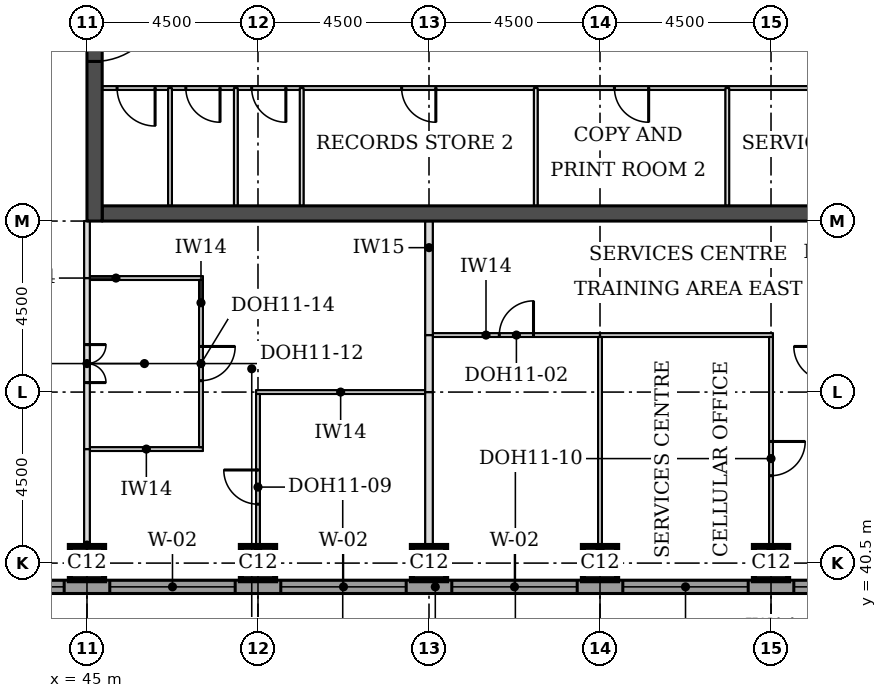
"""IFC4 building model, lengths in metres.
Left out: names, types, materials, properties, quantities, classifications, styles, units other than length and angle.
Written with IfcOpenShell. Run it as: python <this file> out.ifc"""

import sys

from ifc_helpers import new_model, si_unit, direction, frame, frame_2d, origin, origin_2d, place, context, subcontext, project, spatial, rectangle, extrude, element, fill, save


model = new_model("IFC4")
c1 = context("Model", 3, precision=1e-05, world=origin(), true_north=direction((0.0, 1.0)))
c2 = subcontext(c1, "Body", "Model", "MODEL_VIEW")
j1 = project(units=[si_unit("LENGTHUNIT", "METRE"), si_unit("PLANEANGLEUNIT", "RADIAN")], contexts=[c1])
p1 = place(None, origin())
s1 = spatial("IfcSite", under=j1, at=p1, CompositionType="ELEMENT")
p2 = place(p1, origin())
s2 = spatial("IfcBuilding", under=s1, at=p2, CompositionType="ELEMENT")
p3 = place(p2, frame((0.0, 0.0, 237.8)))
s3 = spatial("IfcBuildingStorey", under=s2, at=p3, CompositionType="ELEMENT", Elevation=237.8)
for number, where, z_axis, x_axis in (
    (1, (45.0, 40.5, 0.0), (0.0, 0.0, 1.0), (1.0, 0.0, 0.0)),
    (2, (49.5, 40.5, 0.0), (0.0, 0.0, 1.0), (1.0, 0.0, 0.0)),
    (3, (54.0, 40.5, 0.0), (0.0, 0.0, 1.0), (1.0, 0.0, 0.0)),
    (4, (58.5, 40.5, 0.0), (0.0, 0.0, 1.0), (1.0, 0.0, 0.0)),
    (5, (63.0, 40.5, 0.0), (0.0, 0.0, 1.0), (1.0, 0.0, 0.0)),
):
    element("IfcColumn", number, at=place(p3, frame(where, z_axis=z_axis, x_axis=x_axis)), inside=s3, PredefinedType="COLUMN", context=c2, shape_type="SweptSolid", body=[
        extrude(rectangle(XDim=0.9, YDim=0.9, at=origin_2d()), origin(), (0.0, 0.0, 1.0), 3.7),
    ])
p4 = place(p3, frame((45.4, 49.7, 0.0), z_axis=(0.0, 0.0, 1.0), x_axis=(1.0, 0.0, 0.0)))
e6 = element("IfcWall", 6, at=p4, inside=s3, PredefinedType="SHEAR", context=c2, shape_type="SweptSolid", body=[
    extrude(rectangle(XDim=21.7, YDim=0.4, at=frame_2d((10.85, 0.0))), origin(), (0.0, 0.0, 1.0), 3.7),
])
p5 = place(p3, frame((45.2, 49.5, 0.0), z_axis=(0.0, 0.0, 1.0), x_axis=(0.0, 1.0, 0.0)))
e7 = element("IfcWall", 7, at=p5, inside=s3, PredefinedType="SHEAR", context=c2, shape_type="SweptSolid", body=[
    extrude(rectangle(XDim=22.5, YDim=0.4, at=frame_2d((11.25, 0.0))), origin(), (0.0, 0.0, 1.0), 3.7),
])
p6 = place(p5, frame((4.2, 0.0, 0.0)))
e8 = element("IfcOpeningElement", 8, at=p6, cuts=e7, PredefinedType="OPENING", context=c2, shape_type="SweptSolid", body=[
    extrude(rectangle(XDim=1.8, YDim=2.1, at=frame_2d((0.9, 1.05))), frame((0.0, 0.21, 0.0), z_axis=(0.0, -1.0, 0.0), x_axis=(1.0, 0.0, 0.0)), (0.0, 0.0, 1.0), 0.42),
])
p7 = place(p5, frame((6.9, 0.0, 0.0)))
e9 = element("IfcOpeningElement", 9, at=p7, cuts=e7, PredefinedType="OPENING", context=c2, shape_type="SweptSolid", body=[
    extrude(rectangle(XDim=1.1, YDim=2.1, at=frame_2d((0.55, 1.05))), frame((0.0, 0.21, 0.0), z_axis=(0.0, -1.0, 0.0), x_axis=(1.0, 0.0, 0.0)), (0.0, 0.0, 1.0), 0.42),
])
p8 = place(p5, frame((13.6, 0.0, 0.0)))
e10 = element("IfcOpeningElement", 10, at=p8, cuts=e7, PredefinedType="OPENING", context=c2, shape_type="SweptSolid", body=[
    extrude(rectangle(XDim=1.1, YDim=2.1, at=frame_2d((0.55, 1.05))), frame((0.0, 0.21, 0.0), z_axis=(0.0, -1.0, 0.0), x_axis=(1.0, 0.0, 0.0)), (0.0, 0.0, 1.0), 0.42),
])
p9 = place(p5, frame((16.5, 0.0, 0.0)))
e11 = element("IfcOpeningElement", 11, at=p9, cuts=e7, PredefinedType="OPENING", context=c2, shape_type="SweptSolid", body=[
    extrude(rectangle(XDim=1.8, YDim=2.1, at=frame_2d((0.9, 1.05))), frame((0.0, 0.21, 0.0), z_axis=(0.0, -1.0, 0.0), x_axis=(1.0, 0.0, 0.0)), (0.0, 0.0, 1.0), 0.42),
])
p10 = place(p3, frame((36.0, 39.875, 0.0), z_axis=(0.0, 0.0, 1.0), x_axis=(1.0, 0.0, 0.0)))
e12 = element("IfcWall", 12, at=p10, inside=s3, PredefinedType="STANDARD", context=c2, shape_type="SweptSolid", body=[
    extrude(rectangle(XDim=36.331, YDim=0.35, at=frame_2d((18.166, 0.0))), origin(), (0.0, 0.0, 1.0), 3.525),
])
p11 = place(p10, frame((5.1, 0.0, 0.9)))
e13 = element("IfcOpeningElement", 13, at=p11, cuts=e12, PredefinedType="OPENING", context=c2, shape_type="SweptSolid", body=[
    extrude(rectangle(XDim=3.3, YDim=1.9, at=frame_2d((1.65, 0.95))), frame((0.0, 0.185, 0.0), z_axis=(0.0, -1.0, 0.0), x_axis=(1.0, 0.0, 0.0)), (0.0, 0.0, 1.0), 0.37),
])
p12 = place(p10, frame((9.6, 0.0, 0.9)))
e14 = element("IfcOpeningElement", 14, at=p12, cuts=e12, PredefinedType="OPENING", context=c2, shape_type="SweptSolid", body=[
    extrude(rectangle(XDim=3.3, YDim=1.9, at=frame_2d((1.65, 0.95))), frame((0.0, 0.185, 0.0), z_axis=(0.0, -1.0, 0.0), x_axis=(1.0, 0.0, 0.0)), (0.0, 0.0, 1.0), 0.37),
])
p13 = place(p10, frame((14.1, 0.0, 0.9)))
e15 = element("IfcOpeningElement", 15, at=p13, cuts=e12, PredefinedType="OPENING", context=c2, shape_type="SweptSolid", body=[
    extrude(rectangle(XDim=3.3, YDim=1.9, at=frame_2d((1.65, 0.95))), frame((0.0, 0.185, 0.0), z_axis=(0.0, -1.0, 0.0), x_axis=(1.0, 0.0, 0.0)), (0.0, 0.0, 1.0), 0.37),
])
p14 = place(p10, frame((18.6, 0.0, 0.9)))
e16 = element("IfcOpeningElement", 16, at=p14, cuts=e12, PredefinedType="OPENING", context=c2, shape_type="SweptSolid", body=[
    extrude(rectangle(XDim=3.3, YDim=1.9, at=frame_2d((1.65, 0.95))), frame((0.0, 0.185, 0.0), z_axis=(0.0, -1.0, 0.0), x_axis=(1.0, 0.0, 0.0)), (0.0, 0.0, 1.0), 0.37),
])
p15 = place(p10, frame((23.1, 0.0, 0.9)))
e17 = element("IfcOpeningElement", 17, at=p15, cuts=e12, PredefinedType="OPENING", context=c2, shape_type="SweptSolid", body=[
    extrude(rectangle(XDim=3.3, YDim=1.9, at=frame_2d((1.65, 0.95))), frame((0.0, 0.185, 0.0), z_axis=(0.0, -1.0, 0.0), x_axis=(1.0, 0.0, 0.0)), (0.0, 0.0, 1.0), 0.37),
])
p16 = place(p10, frame((27.6, 0.0, 0.9)))
e18 = element("IfcOpeningElement", 18, at=p16, cuts=e12, PredefinedType="OPENING", context=c2, shape_type="SweptSolid", body=[
    extrude(rectangle(XDim=3.3, YDim=1.9, at=frame_2d((1.65, 0.95))), frame((0.0, 0.185, 0.0), z_axis=(0.0, -1.0, 0.0), x_axis=(1.0, 0.0, 0.0)), (0.0, 0.0, 1.0), 0.37),
])
p17 = place(p3, frame((45.075, 43.5, 0.0), z_axis=(0.0, 0.0, 1.0), x_axis=(1.0, 0.0, 0.0)))
e19 = element("IfcWall", 19, at=p17, inside=s3, PredefinedType="PARTITIONING", context=c2, shape_type="SweptSolid", body=[
    extrude(rectangle(XDim=2.975, YDim=0.1, at=frame_2d((1.488, 0.0))), origin(), (0.0, 0.0, 1.0), 3.55),
])
p18 = place(p3, frame((49.45, 45.0, 0.0), z_axis=(0.0, 0.0, 1.0), x_axis=(1.0, 0.0, 0.0)))
e20 = element("IfcWall", 20, at=p18, inside=s3, PredefinedType="PARTITIONING", context=c2, shape_type="SweptSolid", body=[
    extrude(rectangle(XDim=4.45, YDim=0.1, at=frame_2d((2.225, 0.0))), origin(), (0.0, 0.0, 1.0), 3.55),
])
p19 = place(p3, frame((54.1, 46.5, 0.0), z_axis=(0.0, 0.0, 1.0), x_axis=(1.0, 0.0, 0.0)))
e21 = element("IfcWall", 21, at=p19, inside=s3, PredefinedType="PARTITIONING", context=c2, shape_type="SweptSolid", body=[
    extrude(rectangle(XDim=4.4, YDim=0.1, at=frame_2d((2.2, 0.0))), origin(), (0.0, 0.0, 1.0), 3.55),
])
p20 = place(p19, frame((1.75, 0.0, 0.0)))
e22 = element("IfcOpeningElement", 22, at=p20, cuts=e21, PredefinedType="OPENING", context=c2, shape_type="SweptSolid", body=[
    extrude(rectangle(XDim=0.9, YDim=2.1, at=frame_2d((0.45, 1.05))), frame((0.0, 0.06, 0.0), z_axis=(0.0, -1.0, 0.0), x_axis=(1.0, 0.0, 0.0)), (0.0, 0.0, 1.0), 0.12),
])
p21 = place(p3, frame((58.5, 46.5, 0.0), z_axis=(0.0, 0.0, 1.0), x_axis=(1.0, 0.0, 0.0)))
e23 = element("IfcWall", 23, at=p21, inside=s3, PredefinedType="PARTITIONING", context=c2, shape_type="SweptSolid", body=[
    extrude(rectangle(XDim=4.55, YDim=0.1, at=frame_2d((2.275, 0.0))), origin(), (0.0, 0.0, 1.0), 3.55),
])
p22 = place(p3, frame((45.075, 48.0, 0.0), z_axis=(0.0, 0.0, 1.0), x_axis=(1.0, 0.0, 0.0)))
e24 = element("IfcWall", 24, at=p22, inside=s3, PredefinedType="PARTITIONING", context=c2, shape_type="SweptSolid", body=[
    extrude(rectangle(XDim=2.975, YDim=0.1, at=frame_2d((1.488, 0.0))), origin(), (0.0, 0.0, 1.0), 3.55),
])
p23 = place(p3, frame((45.0, 40.05, 0.0), z_axis=(0.0, 0.0, 1.0), x_axis=(0.0, 1.0, 0.0)))
e25 = element("IfcWall", 25, at=p23, inside=s3, PredefinedType="PARTITIONING", context=c2, shape_type="SweptSolid", body=[
    extrude(rectangle(XDim=3.45, YDim=0.15, at=frame_2d((1.725, 0.0))), origin(), (0.0, 0.0, 1.0), 3.022),
])
p24 = place(p3, frame((49.5, 40.05, 0.0), z_axis=(0.0, 0.0, 1.0), x_axis=(0.0, 1.0, 0.0)))
e26 = element("IfcWall", 26, at=p24, inside=s3, PredefinedType="PARTITIONING", context=c2, shape_type="SweptSolid", body=[
    extrude(rectangle(XDim=4.9, YDim=0.1, at=frame_2d((2.45, 0.0))), origin(), (0.0, 0.0, 1.0), 3.55),
])
p25 = place(p24, frame((2.0, 0.0, 0.0)))
e27 = element("IfcOpeningElement", 27, at=p25, cuts=e26, PredefinedType="OPENING", context=c2, shape_type="SweptSolid", body=[
    extrude(rectangle(XDim=0.9, YDim=2.1, at=frame_2d((0.45, 1.05))), frame((0.0, 0.06, 0.0), z_axis=(0.0, -1.0, 0.0), x_axis=(1.0, 0.0, 0.0)), (0.0, 0.0, 1.0), 0.12),
])
p26 = place(p3, frame((54.0, 40.05, 0.0), z_axis=(0.0, 0.0, 1.0), x_axis=(0.0, 1.0, 0.0)))
e28 = element("IfcWall", 28, at=p26, inside=s3, PredefinedType="PARTITIONING", context=c2, shape_type="SweptSolid", body=[
    extrude(rectangle(XDim=4.95, YDim=0.2, at=frame_2d((2.475, 0.0))), origin(), (0.0, 0.0, 1.0), 3.55),
])
p27 = place(p3, frame((58.5, 40.05, 0.0), z_axis=(0.0, 0.0, 1.0), x_axis=(0.0, 1.0, 0.0)))
e29 = element("IfcWall", 29, at=p27, inside=s3, PredefinedType="PARTITIONING", context=c2, shape_type="SweptSolid", body=[
    extrude(rectangle(XDim=6.4, YDim=0.1, at=frame_2d((3.2, 0.0))), origin(), (0.0, 0.0, 1.0), 3.55),
])
p28 = place(p3, frame((63.0, 40.05, 0.0), z_axis=(0.0, 0.0, 1.0), x_axis=(0.0, 1.0, 0.0)))
e30 = element("IfcWall", 30, at=p28, inside=s3, PredefinedType="PARTITIONING", context=c2, shape_type="SweptSolid", body=[
    extrude(rectangle(XDim=6.4, YDim=0.1, at=frame_2d((3.2, 0.0))), origin(), (0.0, 0.0, 1.0), 3.55),
])
p29 = place(p28, frame((2.75, 0.0, 0.0)))
e31 = element("IfcOpeningElement", 31, at=p29, cuts=e30, PredefinedType="OPENING", context=c2, shape_type="SweptSolid", body=[
    extrude(rectangle(XDim=0.9, YDim=2.1, at=frame_2d((0.45, 1.05))), frame((0.0, 0.06, 0.0), z_axis=(0.0, -1.0, 0.0), x_axis=(1.0, 0.0, 0.0)), (0.0, 0.0, 1.0), 0.12),
])
p30 = place(p3, frame((45.0, 43.5, 0.0), z_axis=(0.0, 0.0, 1.0), x_axis=(0.0, 1.0, 0.0)))
e32 = element("IfcWall", 32, at=p30, inside=s3, PredefinedType="PARTITIONING", context=c2, shape_type="SweptSolid", body=[
    extrude(rectangle(XDim=4.5, YDim=0.15, at=frame_2d((2.25, 0.0))), origin(), (0.0, 0.0, 1.0), 3.022),
])
p31 = place(p30, frame((1.75, 0.0, 0.0)))
e33 = element("IfcOpeningElement", 33, at=p31, cuts=e32, PredefinedType="OPENING", context=c2, shape_type="SweptSolid", body=[
    extrude(rectangle(XDim=1.0, YDim=2.1, at=frame_2d((0.5, 1.05))), frame((0.0, 0.085, 0.0), z_axis=(0.0, -1.0, 0.0), x_axis=(1.0, 0.0, 0.0)), (0.0, 0.0, 1.0), 0.17),
])
p32 = place(p3, frame((48.0, 43.55, 0.0), z_axis=(0.0, 0.0, 1.0), x_axis=(0.0, 1.0, 0.0)))
e34 = element("IfcWall", 34, at=p32, inside=s3, PredefinedType="PARTITIONING", context=c2, shape_type="SweptSolid", body=[
    extrude(rectangle(XDim=4.4, YDim=0.1, at=frame_2d((2.2, 0.0))), origin(), (0.0, 0.0, 1.0), 3.55),
])
p33 = place(p32, frame((1.75, 0.0, 0.0)))
e35 = element("IfcOpeningElement", 35, at=p33, cuts=e34, PredefinedType="OPENING", context=c2, shape_type="SweptSolid", body=[
    extrude(rectangle(XDim=0.9, YDim=2.1, at=frame_2d((0.45, 1.05))), frame((0.0, 0.06, 0.0), z_axis=(0.0, -1.0, 0.0), x_axis=(1.0, 0.0, 0.0)), (0.0, 0.0, 1.0), 0.12),
])
p34 = place(p3, frame((54.0, 45.0, 0.0), z_axis=(0.0, 0.0, 1.0), x_axis=(0.0, 1.0, 0.0)))
e36 = element("IfcWall", 36, at=p34, inside=s3, PredefinedType="PARTITIONING", context=c2, shape_type="SweptSolid", body=[
    extrude(rectangle(XDim=1.5, YDim=0.2, at=frame_2d((0.75, 0.0))), origin(), (0.0, 0.0, 1.0), 3.55),
])
p35 = place(p3, frame((54.0, 46.5, 0.0), z_axis=(0.0, 0.0, 1.0), x_axis=(0.0, 1.0, 0.0)))
e37 = element("IfcWall", 37, at=p35, inside=s3, PredefinedType="PARTITIONING", context=c2, shape_type="SweptSolid", body=[
    extrude(rectangle(XDim=3.0, YDim=0.2, at=frame_2d((1.5, 0.0))), origin(), (0.0, 0.0, 1.0), 3.55),
])
p36 = place(p3, frame((45.0, 48.0, 0.0), z_axis=(0.0, 0.0, 1.0), x_axis=(0.0, 1.0, 0.0)))
e38 = element("IfcWall", 38, at=p36, inside=s3, PredefinedType="PARTITIONING", context=c2, shape_type="SweptSolid", body=[
    extrude(rectangle(XDim=1.5, YDim=0.15, at=frame_2d((0.75, 0.0))), origin(), (0.0, 0.0, 1.0), 3.022),
])
p37 = place(p3, frame((45.4, 53.0, 0.0), z_axis=(0.0, 0.0, 1.0), x_axis=(1.0, 0.0, 0.0)))
e39 = element("IfcWall", 39, at=p37, inside=s3, PredefinedType="PARTITIONING", context=c2, shape_type="SweptSolid", body=[
    extrude(rectangle(XDim=21.7, YDim=0.1, at=frame_2d((10.85, 0.0))), origin(), (0.0, 0.0, 1.0), 3.55),
])
p38 = place(p37, frame((18.625, 0.0, 0.0)))
e40 = element("IfcOpeningElement", 40, at=p38, cuts=e39, PredefinedType="OPENING", context=c2, shape_type="SweptSolid", body=[
    extrude(rectangle(XDim=0.9, YDim=2.1, at=frame_2d((0.45, 1.05))), frame((0.0, 0.06, 0.0), z_axis=(0.0, -1.0, 0.0), x_axis=(1.0, 0.0, 0.0)), (0.0, 0.0, 1.0), 0.12),
])
p39 = place(p37, frame((0.393, 0.0, 0.0)))
e41 = element("IfcOpeningElement", 41, at=p39, cuts=e39, PredefinedType="OPENING", context=c2, shape_type="SweptSolid", body=[
    extrude(rectangle(XDim=1.0, YDim=2.1, at=frame_2d((0.5, 1.05))), frame((0.0, 0.06, 0.0), z_axis=(0.0, -1.0, 0.0), x_axis=(1.0, 0.0, 0.0)), (0.0, 0.0, 1.0), 0.12),
])
p40 = place(p37, frame((2.201, 0.0, 0.0)))
e42 = element("IfcOpeningElement", 42, at=p40, cuts=e39, PredefinedType="OPENING", context=c2, shape_type="SweptSolid", body=[
    extrude(rectangle(XDim=0.9, YDim=2.1, at=frame_2d((0.45, 1.05))), frame((0.0, 0.06, 0.0), z_axis=(0.0, -1.0, 0.0), x_axis=(1.0, 0.0, 0.0)), (0.0, 0.0, 1.0), 0.12),
])
p41 = place(p37, frame((3.934, 0.0, 0.0)))
e43 = element("IfcOpeningElement", 43, at=p41, cuts=e39, PredefinedType="OPENING", context=c2, shape_type="SweptSolid", body=[
    extrude(rectangle(XDim=0.9, YDim=2.1, at=frame_2d((0.45, 1.05))), frame((0.0, 0.06, 0.0), z_axis=(0.0, -1.0, 0.0), x_axis=(1.0, 0.0, 0.0)), (0.0, 0.0, 1.0), 0.12),
])
p42 = place(p37, frame((7.88, 0.0, 0.0)))
e44 = element("IfcOpeningElement", 44, at=p42, cuts=e39, PredefinedType="OPENING", context=c2, shape_type="SweptSolid", body=[
    extrude(rectangle(XDim=0.9, YDim=2.1, at=frame_2d((0.45, 1.05))), frame((0.0, 0.06, 0.0), z_axis=(0.0, -1.0, 0.0), x_axis=(1.0, 0.0, 0.0)), (0.0, 0.0, 1.0), 0.12),
])
p43 = place(p37, frame((13.48, 0.0, 0.0)))
e45 = element("IfcOpeningElement", 45, at=p43, cuts=e39, PredefinedType="OPENING", context=c2, shape_type="SweptSolid", body=[
    extrude(rectangle(XDim=0.9, YDim=2.1, at=frame_2d((0.45, 1.05))), frame((0.0, 0.06, 0.0), z_axis=(0.0, -1.0, 0.0), x_axis=(1.0, 0.0, 0.0)), (0.0, 0.0, 1.0), 0.12),
])
for number, where, z_axis, x_axis in (
    (46, (47.185, 49.9, 0.0), (0.0, 0.0, 1.0), (0.0, 1.0, 0.0)),
    (47, (48.917, 49.9, 0.0), (0.0, 0.0, 1.0), (0.0, 1.0, 0.0)),
    (48, (50.65, 49.9, 0.0), (0.0, 0.0, 1.0), (0.0, 1.0, 0.0)),
    (49, (56.81, 49.9, 0.0), (0.0, 0.0, 1.0), (0.0, 1.0, 0.0)),
    (50, (61.85, 49.9, 0.0), (0.0, 0.0, 1.0), (0.0, 1.0, 0.0)),
):
    element("IfcWall", number, at=place(p3, frame(where, z_axis=z_axis, x_axis=x_axis)), inside=s3, PredefinedType="PARTITIONING", context=c2, shape_type="SweptSolid", body=[
        extrude(rectangle(XDim=3.1, YDim=0.1, at=frame_2d((1.55, 0.0))), origin(), (0.0, 0.0, 1.0), 3.55),
    ])
p44 = place(p11, origin())
e51 = element("IfcWindow", 51, at=p44, inside=s3, PartitioningType="SINGLE_PANEL", PredefinedType="WINDOW", context=c2, shape_type="SweptSolid", body=[
    extrude(rectangle(XDim=3.3, YDim=1.9, at=frame_2d((1.65, 0.95))), frame((0.0, 0.085, 0.0), z_axis=(0.0, -1.0, 0.0), x_axis=(1.0, 0.0, 0.0)), (0.0, 0.0, 1.0), 0.06),
])
fill(e13, e51)
p45 = place(p12, origin())
e52 = element("IfcWindow", 52, at=p45, inside=s3, PartitioningType="SINGLE_PANEL", PredefinedType="WINDOW", context=c2, shape_type="SweptSolid", body=[
    extrude(rectangle(XDim=3.3, YDim=1.9, at=frame_2d((1.65, 0.95))), frame((0.0, 0.085, 0.0), z_axis=(0.0, -1.0, 0.0), x_axis=(1.0, 0.0, 0.0)), (0.0, 0.0, 1.0), 0.06),
])
fill(e14, e52)
p46 = place(p13, origin())
e53 = element("IfcWindow", 53, at=p46, inside=s3, PartitioningType="SINGLE_PANEL", PredefinedType="WINDOW", context=c2, shape_type="SweptSolid", body=[
    extrude(rectangle(XDim=3.3, YDim=1.9, at=frame_2d((1.65, 0.95))), frame((0.0, 0.085, 0.0), z_axis=(0.0, -1.0, 0.0), x_axis=(1.0, 0.0, 0.0)), (0.0, 0.0, 1.0), 0.06),
])
fill(e15, e53)
p47 = place(p14, origin())
e54 = element("IfcWindow", 54, at=p47, inside=s3, PartitioningType="SINGLE_PANEL", PredefinedType="WINDOW", context=c2, shape_type="SweptSolid", body=[
    extrude(rectangle(XDim=3.3, YDim=1.9, at=frame_2d((1.65, 0.95))), frame((0.0, 0.085, 0.0), z_axis=(0.0, -1.0, 0.0), x_axis=(1.0, 0.0, 0.0)), (0.0, 0.0, 1.0), 0.06),
])
fill(e16, e54)
p48 = place(p15, origin())
e55 = element("IfcWindow", 55, at=p48, inside=s3, PartitioningType="SINGLE_PANEL", PredefinedType="WINDOW", context=c2, shape_type="SweptSolid", body=[
    extrude(rectangle(XDim=3.3, YDim=1.9, at=frame_2d((1.65, 0.95))), frame((0.0, 0.085, 0.0), z_axis=(0.0, -1.0, 0.0), x_axis=(1.0, 0.0, 0.0)), (0.0, 0.0, 1.0), 0.06),
])
fill(e17, e55)
p49 = place(p16, origin())
e56 = element("IfcWindow", 56, at=p49, inside=s3, PartitioningType="SINGLE_PANEL", PredefinedType="WINDOW", context=c2, shape_type="SweptSolid", body=[
    extrude(rectangle(XDim=3.3, YDim=1.9, at=frame_2d((1.65, 0.95))), frame((0.0, 0.085, 0.0), z_axis=(0.0, -1.0, 0.0), x_axis=(1.0, 0.0, 0.0)), (0.0, 0.0, 1.0), 0.06),
])
fill(e18, e56)
p50 = place(p31, frame((1.0, 0.0, 0.0), z_axis=(0.0, 0.0, 1.0), x_axis=(-1.0, 0.0, 0.0)))
e57 = element("IfcDoor", 57, at=p50, inside=s3, OperationType="DOUBLE_DOOR_SINGLE_SWING", PredefinedType="DOOR", context=c2, shape_type="SweptSolid", body=[
    extrude(rectangle(XDim=1.0, YDim=2.1, at=frame_2d((0.5, 1.05))), frame((0.0, 0.025, 0.0), z_axis=(0.0, -1.0, 0.0), x_axis=(1.0, 0.0, 0.0)), (0.0, 0.0, 1.0), 0.05),
])
fill(e33, e57)
p51 = place(p33, frame((0.9, 0.0, 0.0), z_axis=(0.0, 0.0, 1.0), x_axis=(-1.0, 0.0, 0.0)))
e58 = element("IfcDoor", 58, at=p51, inside=s3, OperationType="SINGLE_SWING_LEFT", PredefinedType="DOOR", context=c2, shape_type="SweptSolid", body=[
    extrude(rectangle(XDim=0.9, YDim=2.1, at=frame_2d((0.45, 1.05))), frame((0.0, 0.025, 0.0), z_axis=(0.0, -1.0, 0.0), x_axis=(1.0, 0.0, 0.0)), (0.0, 0.0, 1.0), 0.05),
])
fill(e35, e58)
p52 = place(p25, origin())
e59 = element("IfcDoor", 59, at=p52, inside=s3, OperationType="SINGLE_SWING_RIGHT", PredefinedType="DOOR", context=c2, shape_type="SweptSolid", body=[
    extrude(rectangle(XDim=0.9, YDim=2.1, at=frame_2d((0.45, 1.05))), frame((0.0, 0.025, 0.0), z_axis=(0.0, -1.0, 0.0), x_axis=(1.0, 0.0, 0.0)), (0.0, 0.0, 1.0), 0.05),
])
fill(e27, e59)
p53 = place(p20, origin())
e60 = element("IfcDoor", 60, at=p53, inside=s3, OperationType="SINGLE_SWING_RIGHT", PredefinedType="DOOR", context=c2, shape_type="SweptSolid", body=[
    extrude(rectangle(XDim=0.9, YDim=2.1, at=frame_2d((0.45, 1.05))), frame((0.0, 0.025, 0.0), z_axis=(0.0, -1.0, 0.0), x_axis=(1.0, 0.0, 0.0)), (0.0, 0.0, 1.0), 0.05),
])
fill(e22, e60)
p54 = place(p29, frame((0.9, 0.0, 0.0), z_axis=(0.0, 0.0, 1.0), x_axis=(-1.0, 0.0, 0.0)))
e61 = element("IfcDoor", 61, at=p54, inside=s3, OperationType="SINGLE_SWING_LEFT", PredefinedType="DOOR", context=c2, shape_type="SweptSolid", body=[
    extrude(rectangle(XDim=0.9, YDim=2.1, at=frame_2d((0.45, 1.05))), frame((0.0, 0.025, 0.0), z_axis=(0.0, -1.0, 0.0), x_axis=(1.0, 0.0, 0.0)), (0.0, 0.0, 1.0), 0.05),
])
fill(e31, e61)
p55 = place(p6, frame((1.8, 0.0, 0.0), z_axis=(0.0, 0.0, 1.0), x_axis=(-1.0, 0.0, 0.0)))
e62 = element("IfcDoor", 62, at=p55, inside=s3, OperationType="SINGLE_SWING_LEFT", PredefinedType="DOOR", context=c2, shape_type="SweptSolid", body=[
    extrude(rectangle(XDim=1.8, YDim=2.1, at=frame_2d((0.9, 1.05))), frame((0.0, 0.025, 0.0), z_axis=(0.0, -1.0, 0.0), x_axis=(1.0, 0.0, 0.0)), (0.0, 0.0, 1.0), 0.05),
])
fill(e8, e62)
p56 = place(p39, frame((1.0, 0.0, 0.0), z_axis=(0.0, 0.0, 1.0), x_axis=(-1.0, 0.0, 0.0)))
e63 = element("IfcDoor", 63, at=p56, inside=s3, OperationType="SINGLE_SWING_LEFT", PredefinedType="DOOR", context=c2, shape_type="SweptSolid", body=[
    extrude(rectangle(XDim=1.0, YDim=2.1, at=frame_2d((0.5, 1.05))), frame((0.0, 0.025, 0.0), z_axis=(0.0, -1.0, 0.0), x_axis=(1.0, 0.0, 0.0)), (0.0, 0.0, 1.0), 0.05),
])
fill(e41, e63)
p57 = place(p40, frame((0.9, 0.0, 0.0), z_axis=(0.0, 0.0, 1.0), x_axis=(-1.0, 0.0, 0.0)))
e64 = element("IfcDoor", 64, at=p57, inside=s3, OperationType="SINGLE_SWING_LEFT", PredefinedType="DOOR", context=c2, shape_type="SweptSolid", body=[
    extrude(rectangle(XDim=0.9, YDim=2.1, at=frame_2d((0.45, 1.05))), frame((0.0, 0.025, 0.0), z_axis=(0.0, -1.0, 0.0), x_axis=(1.0, 0.0, 0.0)), (0.0, 0.0, 1.0), 0.05),
])
fill(e42, e64)
p58 = place(p41, frame((0.9, 0.0, 0.0), z_axis=(0.0, 0.0, 1.0), x_axis=(-1.0, 0.0, 0.0)))
e65 = element("IfcDoor", 65, at=p58, inside=s3, OperationType="SINGLE_SWING_LEFT", PredefinedType="DOOR", context=c2, shape_type="SweptSolid", body=[
    extrude(rectangle(XDim=0.9, YDim=2.1, at=frame_2d((0.45, 1.05))), frame((0.0, 0.025, 0.0), z_axis=(0.0, -1.0, 0.0), x_axis=(1.0, 0.0, 0.0)), (0.0, 0.0, 1.0), 0.05),
])
fill(e43, e65)
p59 = place(p42, frame((0.9, 0.0, 0.0), z_axis=(0.0, 0.0, 1.0), x_axis=(-1.0, 0.0, 0.0)))
e66 = element("IfcDoor", 66, at=p59, inside=s3, OperationType="SINGLE_SWING_LEFT", PredefinedType="DOOR", context=c2, shape_type="SweptSolid", body=[
    extrude(rectangle(XDim=0.9, YDim=2.1, at=frame_2d((0.45, 1.05))), frame((0.0, 0.025, 0.0), z_axis=(0.0, -1.0, 0.0), x_axis=(1.0, 0.0, 0.0)), (0.0, 0.0, 1.0), 0.05),
])
fill(e44, e66)
p60 = place(p43, frame((0.9, 0.0, 0.0), z_axis=(0.0, 0.0, 1.0), x_axis=(-1.0, 0.0, 0.0)))
e67 = element("IfcDoor", 67, at=p60, inside=s3, OperationType="SINGLE_SWING_LEFT", PredefinedType="DOOR", context=c2, shape_type="SweptSolid", body=[
    extrude(rectangle(XDim=0.9, YDim=2.1, at=frame_2d((0.45, 1.05))), frame((0.0, 0.025, 0.0), z_axis=(0.0, -1.0, 0.0), x_axis=(1.0, 0.0, 0.0)), (0.0, 0.0, 1.0), 0.05),
])
fill(e45, e67)
save(model, sys.argv[1])
